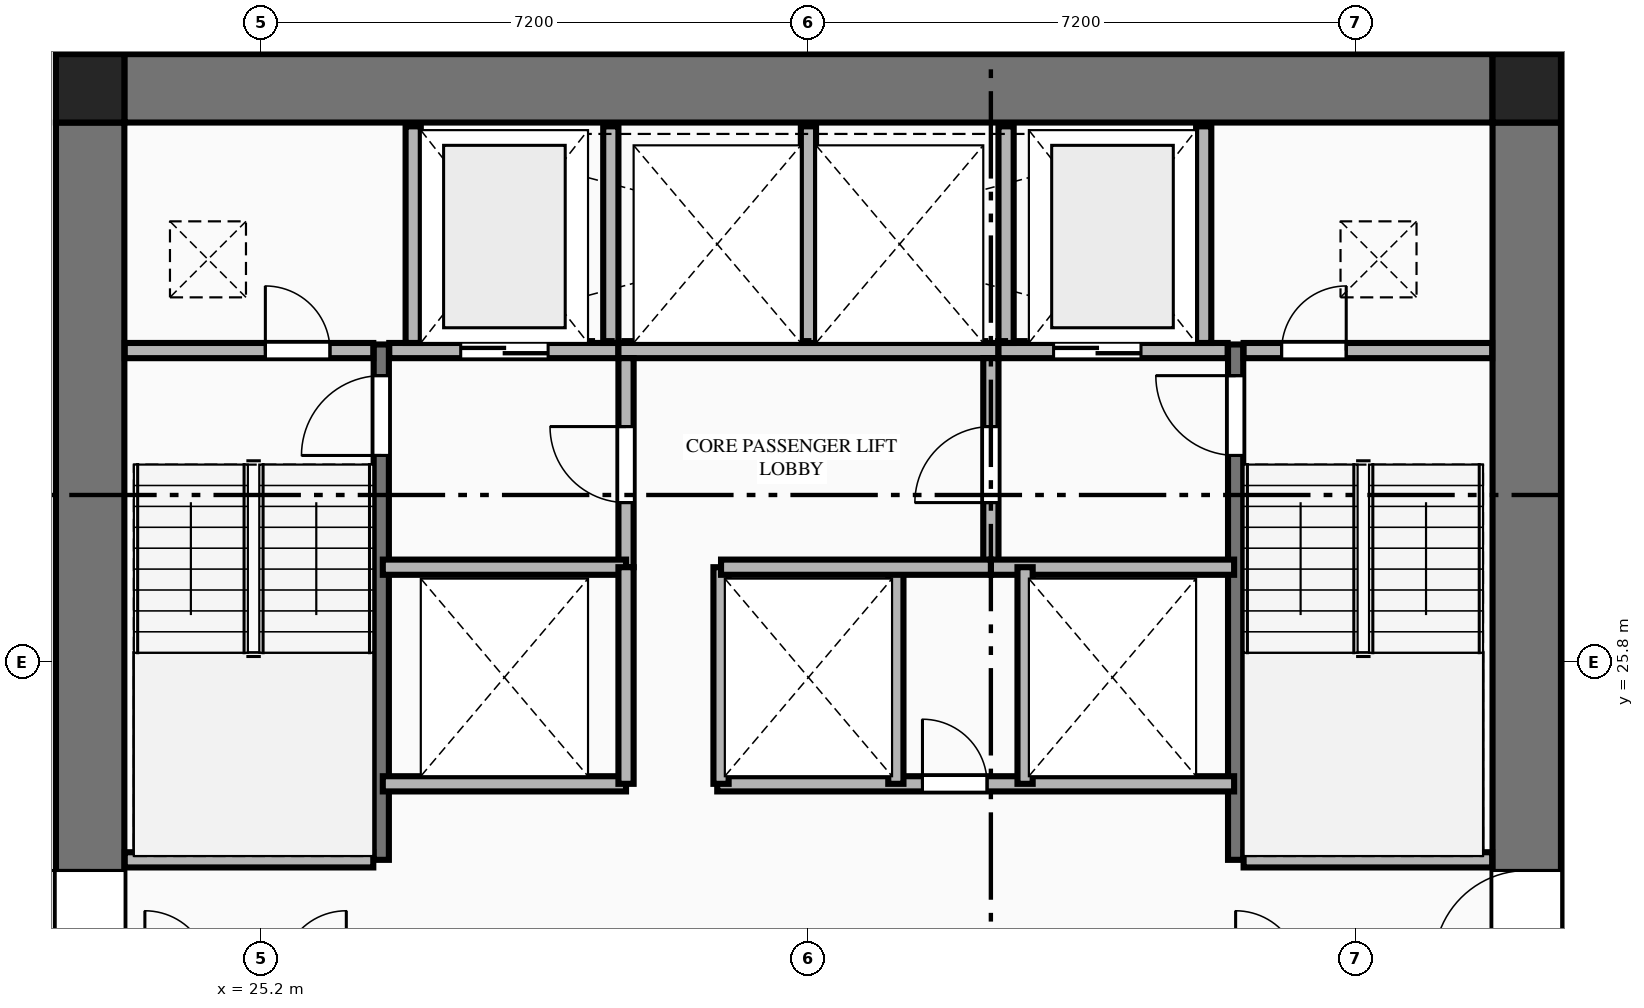
"""IFC4 building model, lengths in metres.
Left out: names, types, materials, properties, quantities, classifications, styles, units other than length and angle.
Written with IfcOpenShell. Run it as: python <this file> out.ifc"""

import sys

from ifc_helpers import new_model, si_unit, direction, frame, frame_2d, origin, origin_2d, place, context, subcontext, project, spatial, rectangle, extrude, element, fill, save


model = new_model("IFC4")
c1 = context("Model", 3, precision=1e-05, world=origin(), true_north=direction((0.0, 1.0)))
c2 = subcontext(c1, "Body", "Model", "MODEL_VIEW")
j1 = project(units=[si_unit("LENGTHUNIT", "METRE"), si_unit("PLANEANGLEUNIT", "RADIAN")], contexts=[c1])
p1 = place(None, origin())
s1 = spatial("IfcSite", under=j1, at=p1, CompositionType="ELEMENT")
p2 = place(p1, origin())
s2 = spatial("IfcBuilding", under=s1, at=p2, CompositionType="ELEMENT")
p3 = place(p2, frame((0.0, 0.0, 35.55)))
s3 = spatial("IfcBuildingStorey", under=s2, at=p3, CompositionType="ELEMENT", Elevation=35.55)
for number, where, z_axis, x_axis in (
    (1, (41.85, 33.35, 0.0), (0.0, 0.0, 1.0), (1.0, 0.0, 0.0)),
    (2, (22.95, 33.35, 0.0), (0.0, 0.0, 1.0), (1.0, 0.0, 0.0)),
):
    element("IfcColumn", number, at=place(p3, frame(where, z_axis=z_axis, x_axis=x_axis)), inside=s3, PredefinedType="COLUMN", context=c2, shape_type="SweptSolid", body=[
        extrude(rectangle(XDim=0.9, YDim=0.9, at=origin_2d()), origin(), (0.0, 0.0, 1.0), 3.55),
    ])
p4 = place(p3, frame((23.4, 33.35, 0.0), z_axis=(0.0, 0.0, 1.0), x_axis=(1.0, 0.0, 0.0)))
e3 = element("IfcWall", 3, at=p4, inside=s3, PredefinedType="SHEAR", context=c2, shape_type="SweptSolid", body=[
    extrude(rectangle(XDim=18.0, YDim=0.9, at=frame_2d((9.0, 0.0))), origin(), (0.0, 0.0, 1.0), 3.33),
])
p5 = place(p3, frame((22.95, 18.9, 0.0), z_axis=(0.0, 0.0, 1.0), x_axis=(0.0, 1.0, 0.0)))
e4 = element("IfcWall", 4, at=p5, inside=s3, PredefinedType="SHEAR", context=c2, shape_type="SweptSolid", body=[
    extrude(rectangle(XDim=14.0, YDim=0.9, at=frame_2d((7.0, 0.0))), origin(), (0.0, 0.0, 1.0), 3.33),
])
p6 = place(p5, frame((2.94, 0.0, 0.0)))
e5 = element("IfcOpeningElement", 5, at=p6, cuts=e4, PredefinedType="OPENING", context=c2, shape_type="SweptSolid", body=[
    extrude(rectangle(XDim=1.22, YDim=2.25, at=frame_2d((0.61, 1.125))), frame((0.0, 0.46, 0.0), z_axis=(0.0, -1.0, 0.0), x_axis=(1.0, 0.0, 0.0)), (0.0, 0.0, 1.0), 0.92),
])
p7 = place(p3, frame((41.85, 18.9, 0.0), z_axis=(0.0, 0.0, 1.0), x_axis=(0.0, 1.0, 0.0)))
e6 = element("IfcWall", 6, at=p7, inside=s3, PredefinedType="SHEAR", context=c2, shape_type="SweptSolid", body=[
    extrude(rectangle(XDim=14.0, YDim=0.9, at=frame_2d((7.0, 0.0))), origin(), (0.0, 0.0, 1.0), 3.33),
])
p8 = place(p7, frame((2.94, 0.0, 0.0)))
e7 = element("IfcOpeningElement", 7, at=p8, cuts=e6, PredefinedType="OPENING", context=c2, shape_type="SweptSolid", body=[
    extrude(rectangle(XDim=1.22, YDim=2.25, at=frame_2d((0.61, 1.125))), frame((0.0, 0.46, 0.0), z_axis=(0.0, -1.0, 0.0), x_axis=(1.0, 0.0, 0.0)), (0.0, 0.0, 1.0), 0.92),
])
p9 = place(p3, frame((26.78, 23.2, 0.0), z_axis=(0.0, 0.0, 1.0), x_axis=(0.0, 1.0, 0.0)))
e8 = element("IfcWall", 8, at=p9, inside=s3, PredefinedType="SHEAR", context=c2, shape_type="SweptSolid", body=[
    extrude(rectangle(XDim=6.78, YDim=0.2, at=frame_2d((3.39, 0.0))), origin(), (0.0, 0.0, 1.0), 3.55),
])
p10 = place(p9, frame((5.32, 0.0, 0.0)))
e9 = element("IfcOpeningElement", 9, at=p10, cuts=e8, PredefinedType="OPENING", context=c2, shape_type="SweptSolid", body=[
    extrude(rectangle(XDim=1.05, YDim=2.15, at=frame_2d((0.525, 1.075))), frame((0.0, 0.11, 0.0), z_axis=(0.0, -1.0, 0.0), x_axis=(1.0, 0.0, 0.0)), (0.0, 0.0, 1.0), 0.22),
])
p11 = place(p3, frame((23.405, 23.2, 0.0), z_axis=(0.0, 0.0, 1.0), x_axis=(1.0, 0.0, 0.0)))
e10 = element("IfcWall", 10, at=p11, inside=s3, PredefinedType="PLUMBINGWALL", context=c2, shape_type="SweptSolid", body=[
    extrude(rectangle(XDim=3.27, YDim=0.2, at=frame_2d((1.635, 0.0))), origin(), (0.0, 0.0, 1.0), 3.33),
])
p12 = place(p3, frame((38.02, 23.2, 0.0), z_axis=(0.0, 0.0, 1.0), x_axis=(0.0, 1.0, 0.0)))
e11 = element("IfcWall", 11, at=p12, inside=s3, PredefinedType="SHEAR", context=c2, shape_type="SweptSolid", body=[
    extrude(rectangle(XDim=6.78, YDim=0.2, at=frame_2d((3.39, 0.0))), origin(), (0.0, 0.0, 1.0), 3.55),
])
p13 = place(p12, frame((5.32, 0.0, 0.0)))
e12 = element("IfcOpeningElement", 12, at=p13, cuts=e11, PredefinedType="OPENING", context=c2, shape_type="SweptSolid", body=[
    extrude(rectangle(XDim=1.05, YDim=2.15, at=frame_2d((0.525, 1.075))), frame((0.0, 0.11, 0.0), z_axis=(0.0, -1.0, 0.0), x_axis=(1.0, 0.0, 0.0)), (0.0, 0.0, 1.0), 0.22),
])
p14 = place(p3, frame((38.125, 23.2, 0.0), z_axis=(0.0, 0.0, 1.0), x_axis=(1.0, 0.0, 0.0)))
e13 = element("IfcWall", 13, at=p14, inside=s3, PredefinedType="PLUMBINGWALL", context=c2, shape_type="SweptSolid", body=[
    extrude(rectangle(XDim=3.27, YDim=0.2, at=frame_2d((1.635, 0.0))), origin(), (0.0, 0.0, 1.0), 3.33),
])
p15 = place(p3, frame((23.405, 29.9, 0.0), z_axis=(0.0, 0.0, 1.0), x_axis=(1.0, 0.0, 0.0)))
e14 = element("IfcWall", 14, at=p15, inside=s3, PredefinedType="PLUMBINGWALL", context=c2, shape_type="SweptSolid", body=[
    extrude(rectangle(XDim=3.27, YDim=0.2, at=frame_2d((1.635, 0.0))), origin(), (0.0, 0.0, 1.0), 3.33),
])
p16 = place(p15, frame((1.85, 0.0, 0.0)))
e15 = element("IfcOpeningElement", 15, at=p16, cuts=e14, PredefinedType="OPENING", context=c2, shape_type="SweptSolid", body=[
    extrude(rectangle(XDim=0.85, YDim=2.05, at=frame_2d((0.425, 1.025))), frame((0.0, 0.11, 0.0), z_axis=(0.0, -1.0, 0.0), x_axis=(1.0, 0.0, 0.0)), (0.0, 0.0, 1.0), 0.22),
])
p17 = place(p3, frame((26.885, 29.9, 0.0), z_axis=(0.0, 0.0, 1.0), x_axis=(1.0, 0.0, 0.0)))
e16 = element("IfcWall", 16, at=p17, inside=s3, PredefinedType="PLUMBINGWALL", context=c2, shape_type="SweptSolid", body=[
    extrude(rectangle(XDim=3.015, YDim=0.2, at=frame_2d((1.507, 0.0))), origin(), (0.0, 0.0, 1.0), 3.33),
])
p18 = place(p17, frame((0.94, 0.0, 0.0)))
e17 = element("IfcOpeningElement", 17, at=p18, cuts=e16, PredefinedType="OPENING", context=c2, shape_type="SweptSolid", body=[
    extrude(rectangle(XDim=1.15, YDim=2.2, at=frame_2d((0.575, 1.1))), frame((0.0, 0.11, 0.0), z_axis=(0.0, -1.0, 0.0), x_axis=(1.0, 0.0, 0.0)), (0.0, 0.0, 1.0), 0.22),
])
p19 = place(p3, frame((29.9, 29.9, 0.0), z_axis=(0.0, 0.0, 1.0), x_axis=(1.0, 0.0, 0.0)))
e18 = element("IfcWall", 18, at=p19, inside=s3, PredefinedType="PLUMBINGWALL", context=c2, shape_type="SweptSolid", body=[
    extrude(rectangle(XDim=5.0, YDim=0.2, at=frame_2d((2.5, 0.0))), origin(), (0.0, 0.0, 1.0), 3.33),
])
p20 = place(p3, frame((34.9, 29.9, 0.0), z_axis=(0.0, 0.0, 1.0), x_axis=(1.0, 0.0, 0.0)))
e19 = element("IfcWall", 19, at=p20, inside=s3, PredefinedType="PLUMBINGWALL", context=c2, shape_type="SweptSolid", body=[
    extrude(rectangle(XDim=3.015, YDim=0.2, at=frame_2d((1.508, 0.0))), origin(), (0.0, 0.0, 1.0), 3.33),
])
p21 = place(p20, frame((0.725, 0.0, 0.0)))
e20 = element("IfcOpeningElement", 20, at=p21, cuts=e19, PredefinedType="OPENING", context=c2, shape_type="SweptSolid", body=[
    extrude(rectangle(XDim=1.15, YDim=2.2, at=frame_2d((0.575, 1.1))), frame((0.0, 0.11, 0.0), z_axis=(0.0, -1.0, 0.0), x_axis=(1.0, 0.0, 0.0)), (0.0, 0.0, 1.0), 0.22),
])
p22 = place(p3, frame((38.125, 29.9, 0.0), z_axis=(0.0, 0.0, 1.0), x_axis=(1.0, 0.0, 0.0)))
e21 = element("IfcWall", 21, at=p22, inside=s3, PredefinedType="PLUMBINGWALL", context=c2, shape_type="SweptSolid", body=[
    extrude(rectangle(XDim=3.27, YDim=0.2, at=frame_2d((1.635, 0.0))), origin(), (0.0, 0.0, 1.0), 3.33),
])
p23 = place(p22, frame((0.5, 0.0, 0.0)))
e22 = element("IfcOpeningElement", 22, at=p23, cuts=e21, PredefinedType="OPENING", context=c2, shape_type="SweptSolid", body=[
    extrude(rectangle(XDim=0.85, YDim=2.05, at=frame_2d((0.425, 1.025))), frame((0.0, 0.11, 0.0), z_axis=(0.0, -1.0, 0.0), x_axis=(1.0, 0.0, 0.0)), (0.0, 0.0, 1.0), 0.22),
])
for number, where, z_axis, x_axis in (
    (23, (27.2, 30.0, 0.0), (0.0, 0.0, 1.0), (0.0, 1.0, 0.0)),
    (24, (29.8, 30.0, 0.0), (0.0, 0.0, 1.0), (0.0, 1.0, 0.0)),
    (25, (32.4, 30.0, 0.0), (0.0, 0.0, 1.0), (0.0, 1.0, 0.0)),
    (26, (35.0, 30.0, 0.0), (0.0, 0.0, 1.0), (0.0, 1.0, 0.0)),
    (27, (37.6, 30.0, 0.0), (0.0, 0.0, 1.0), (0.0, 1.0, 0.0)),
):
    element("IfcWall", number, at=place(p3, frame(where, z_axis=z_axis, x_axis=x_axis)), inside=s3, PredefinedType="PLUMBINGWALL", context=c2, shape_type="SweptSolid", body=[
        extrude(rectangle(XDim=2.85, YDim=0.2, at=frame_2d((1.425, 0.0))), origin(), (0.0, 0.0, 1.0), 3.33),
    ])
p24 = place(p3, frame((30.0, 27.05, 0.0), z_axis=(0.0, 0.0, 1.0), x_axis=(0.0, 1.0, 0.0)))
e28 = element("IfcWall", 28, at=p24, inside=s3, PredefinedType="PLUMBINGWALL", context=c2, shape_type="SweptSolid", body=[
    extrude(rectangle(XDim=2.75, YDim=0.2, at=frame_2d((1.375, 0.0))), origin(), (0.0, 0.0, 1.0), 3.33),
])
p25 = place(p24, frame((0.85, 0.0, 0.0)))
e29 = element("IfcOpeningElement", 29, at=p25, cuts=e28, PredefinedType="OPENING", context=c2, shape_type="SweptSolid", body=[
    extrude(rectangle(XDim=1.0, YDim=2.15, at=frame_2d((0.5, 1.075))), frame((0.0, 0.11, 0.0), z_axis=(0.0, -1.0, 0.0), x_axis=(1.0, 0.0, 0.0)), (0.0, 0.0, 1.0), 0.22),
])
p26 = place(p3, frame((26.8, 27.05, 0.0), z_axis=(0.0, 0.0, 1.0), x_axis=(1.0, 0.0, 0.0)))
e30 = element("IfcWall", 30, at=p26, inside=s3, PredefinedType="PLUMBINGWALL", context=c2, shape_type="SweptSolid", body=[
    extrude(rectangle(XDim=3.2, YDim=0.2, at=frame_2d((1.6, 0.0))), origin(), (0.0, 0.0, 1.0), 3.33),
])
p27 = place(p3, frame((34.8, 27.05, 0.0), z_axis=(0.0, 0.0, 1.0), x_axis=(0.0, 1.0, 0.0)))
e31 = element("IfcWall", 31, at=p27, inside=s3, PredefinedType="PLUMBINGWALL", context=c2, shape_type="SweptSolid", body=[
    extrude(rectangle(XDim=2.75, YDim=0.2, at=frame_2d((1.375, 0.0))), origin(), (0.0, 0.0, 1.0), 3.33),
])
p28 = place(p27, frame((0.85, 0.0, 0.0)))
e32 = element("IfcOpeningElement", 32, at=p28, cuts=e31, PredefinedType="OPENING", context=c2, shape_type="SweptSolid", body=[
    extrude(rectangle(XDim=1.0, YDim=2.15, at=frame_2d((0.5, 1.075))), frame((0.0, 0.11, 0.0), z_axis=(0.0, -1.0, 0.0), x_axis=(1.0, 0.0, 0.0)), (0.0, 0.0, 1.0), 0.22),
])
for number, where, z_axis, x_axis in (
    (33, (34.8, 27.05, 0.0), (0.0, 0.0, 1.0), (1.0, 0.0, 0.0)),
    (34, (26.8, 24.2, 0.0), (0.0, 0.0, 1.0), (1.0, 0.0, 0.0)),
):
    element("IfcWall", number, at=place(p3, frame(where, z_axis=z_axis, x_axis=x_axis)), inside=s3, PredefinedType="PLUMBINGWALL", context=c2, shape_type="SweptSolid", body=[
        extrude(rectangle(XDim=3.2, YDim=0.2, at=frame_2d((1.6, 0.0))), origin(), (0.0, 0.0, 1.0), 3.33),
    ])
p29 = place(p3, frame((30.0, 24.2, 0.0), z_axis=(0.0, 0.0, 1.0), x_axis=(0.0, 1.0, 0.0)))
e35 = element("IfcWall", 35, at=p29, inside=s3, PredefinedType="PLUMBINGWALL", context=c2, shape_type="SweptSolid", body=[
    extrude(rectangle(XDim=2.85, YDim=0.2, at=frame_2d((1.425, 0.0))), origin(), (0.0, 0.0, 1.0), 3.33),
])
p30 = place(p3, frame((31.2, 24.2, 0.0), z_axis=(0.0, 0.0, 1.0), x_axis=(1.0, 0.0, 0.0)))
e36 = element("IfcWall", 36, at=p30, inside=s3, PredefinedType="PLUMBINGWALL", context=c2, shape_type="SweptSolid", body=[
    extrude(rectangle(XDim=6.8, YDim=0.2, at=frame_2d((3.4, 0.0))), origin(), (0.0, 0.0, 1.0), 3.33),
])
p31 = place(p30, frame((2.7, 0.0, 0.0)))
e37 = element("IfcOpeningElement", 37, at=p31, cuts=e36, PredefinedType="OPENING", context=c2, shape_type="SweptSolid", body=[
    extrude(rectangle(XDim=0.85, YDim=2.05, at=frame_2d((0.425, 1.025))), frame((0.0, 0.11, 0.0), z_axis=(0.0, -1.0, 0.0), x_axis=(1.0, 0.0, 0.0)), (0.0, 0.0, 1.0), 0.22),
])
for number, where, z_axis, x_axis in (
    (38, (31.25, 24.2, 0.0), (0.0, 0.0, 1.0), (0.0, 1.0, 0.0)),
    (39, (33.55, 24.2, 0.0), (0.0, 0.0, 1.0), (0.0, 1.0, 0.0)),
    (40, (35.25, 24.2, 0.0), (0.0, 0.0, 1.0), (0.0, 1.0, 0.0)),
):
    element("IfcWall", number, at=place(p3, frame(where, z_axis=z_axis, x_axis=x_axis)), inside=s3, PredefinedType="PLUMBINGWALL", context=c2, shape_type="SweptSolid", body=[
        extrude(rectangle(XDim=2.85, YDim=0.2, at=frame_2d((1.425, 0.0))), origin(), (0.0, 0.0, 1.0), 3.33),
    ])
p32 = place(p3, frame((31.25, 27.05, 0.0), z_axis=(0.0, 0.0, 1.0), x_axis=(1.0, 0.0, 0.0)))
e41 = element("IfcWall", 41, at=p32, inside=s3, PredefinedType="PLUMBINGWALL", context=c2, shape_type="SweptSolid", body=[
    extrude(rectangle(XDim=3.55, YDim=0.2, at=frame_2d((1.775, 0.0))), origin(), (0.0, 0.0, 1.0), 3.33),
])
p33 = place(p6, origin())
e42 = element("IfcDoor", 42, at=p33, inside=s3, OperationType="SINGLE_SWING_RIGHT", PredefinedType="DOOR", context=c2, shape_type="SweptSolid", body=[
    extrude(rectangle(XDim=1.22, YDim=2.25, at=frame_2d((0.61, 1.125))), frame((0.0, 0.025, 0.0), z_axis=(0.0, -1.0, 0.0), x_axis=(1.0, 0.0, 0.0)), (0.0, 0.0, 1.0), 0.05),
])
fill(e5, e42)
p34 = place(p8, origin())
e43 = element("IfcDoor", 43, at=p34, inside=s3, OperationType="SINGLE_SWING_LEFT", PredefinedType="DOOR", context=c2, shape_type="SweptSolid", body=[
    extrude(rectangle(XDim=1.22, YDim=2.25, at=frame_2d((0.61, 1.125))), frame((0.0, 0.025, 0.0), z_axis=(0.0, -1.0, 0.0), x_axis=(1.0, 0.0, 0.0)), (0.0, 0.0, 1.0), 0.05),
])
fill(e7, e43)
p35 = place(p10, origin())
e44 = element("IfcDoor", 44, at=p35, inside=s3, OperationType="SINGLE_SWING_LEFT", PredefinedType="DOOR", context=c2, shape_type="SweptSolid", body=[
    extrude(rectangle(XDim=1.05, YDim=2.15, at=frame_2d((0.525, 1.075))), frame((0.0, 0.025, 0.0), z_axis=(0.0, -1.0, 0.0), x_axis=(1.0, 0.0, 0.0)), (0.0, 0.0, 1.0), 0.05),
])
fill(e9, e44)
p36 = place(p13, origin())
e45 = element("IfcDoor", 45, at=p36, inside=s3, OperationType="SINGLE_SWING_RIGHT", PredefinedType="DOOR", context=c2, shape_type="SweptSolid", body=[
    extrude(rectangle(XDim=1.05, YDim=2.15, at=frame_2d((0.525, 1.075))), frame((0.0, 0.025, 0.0), z_axis=(0.0, -1.0, 0.0), x_axis=(1.0, 0.0, 0.0)), (0.0, 0.0, 1.0), 0.05),
])
fill(e12, e45)
p37 = place(p16, origin())
e46 = element("IfcDoor", 46, at=p37, inside=s3, OperationType="SINGLE_SWING_LEFT", PredefinedType="DOOR", context=c2, shape_type="SweptSolid", body=[
    extrude(rectangle(XDim=0.85, YDim=2.05, at=frame_2d((0.425, 1.025))), frame((0.0, 0.025, 0.0), z_axis=(0.0, -1.0, 0.0), x_axis=(1.0, 0.0, 0.0)), (0.0, 0.0, 1.0), 0.05),
])
fill(e15, e46)
p38 = place(p23, origin())
e47 = element("IfcDoor", 47, at=p38, inside=s3, OperationType="SINGLE_SWING_RIGHT", PredefinedType="DOOR", context=c2, shape_type="SweptSolid", body=[
    extrude(rectangle(XDim=0.85, YDim=2.05, at=frame_2d((0.425, 1.025))), frame((0.0, 0.025, 0.0), z_axis=(0.0, -1.0, 0.0), x_axis=(1.0, 0.0, 0.0)), (0.0, 0.0, 1.0), 0.05),
])
fill(e22, e47)
p39 = place(p18, origin())
e48 = element("IfcDoor", 48, at=p39, inside=s3, OperationType="DOUBLE_DOOR_SLIDING", PredefinedType="DOOR", context=c2, shape_type="SweptSolid", body=[
    extrude(rectangle(XDim=1.15, YDim=2.2, at=frame_2d((0.575, 1.1))), frame((0.0, 0.025, 0.0), z_axis=(0.0, -1.0, 0.0), x_axis=(1.0, 0.0, 0.0)), (0.0, 0.0, 1.0), 0.05),
])
fill(e17, e48)
p40 = place(p21, origin())
e49 = element("IfcDoor", 49, at=p40, inside=s3, OperationType="DOUBLE_DOOR_SLIDING", PredefinedType="DOOR", context=c2, shape_type="SweptSolid", body=[
    extrude(rectangle(XDim=1.15, YDim=2.2, at=frame_2d((0.575, 1.1))), frame((0.0, 0.025, 0.0), z_axis=(0.0, -1.0, 0.0), x_axis=(1.0, 0.0, 0.0)), (0.0, 0.0, 1.0), 0.05),
])
fill(e20, e49)
p41 = place(p25, origin())
e50 = element("IfcDoor", 50, at=p41, inside=s3, OperationType="SINGLE_SWING_RIGHT", PredefinedType="DOOR", context=c2, shape_type="SweptSolid", body=[
    extrude(rectangle(XDim=1.0, YDim=2.15, at=frame_2d((0.5, 1.075))), frame((0.0, 0.025, 0.0), z_axis=(0.0, -1.0, 0.0), x_axis=(1.0, 0.0, 0.0)), (0.0, 0.0, 1.0), 0.05),
])
fill(e29, e50)
p42 = place(p28, origin())
e51 = element("IfcDoor", 51, at=p42, inside=s3, OperationType="SINGLE_SWING_LEFT", PredefinedType="DOOR", context=c2, shape_type="SweptSolid", body=[
    extrude(rectangle(XDim=1.0, YDim=2.15, at=frame_2d((0.5, 1.075))), frame((0.0, 0.025, 0.0), z_axis=(0.0, -1.0, 0.0), x_axis=(1.0, 0.0, 0.0)), (0.0, 0.0, 1.0), 0.05),
])
fill(e32, e51)
p43 = place(p31, origin())
e52 = element("IfcDoor", 52, at=p43, inside=s3, OperationType="SINGLE_SWING_LEFT", PredefinedType="DOOR", context=c2, shape_type="SweptSolid", body=[
    extrude(rectangle(XDim=0.85, YDim=2.05, at=frame_2d((0.425, 1.025))), frame((0.0, 0.025, 0.0), z_axis=(0.0, -1.0, 0.0), x_axis=(1.0, 0.0, 0.0)), (0.0, 0.0, 1.0), 0.05),
])
fill(e37, e52)
save(model, sys.argv[1])
